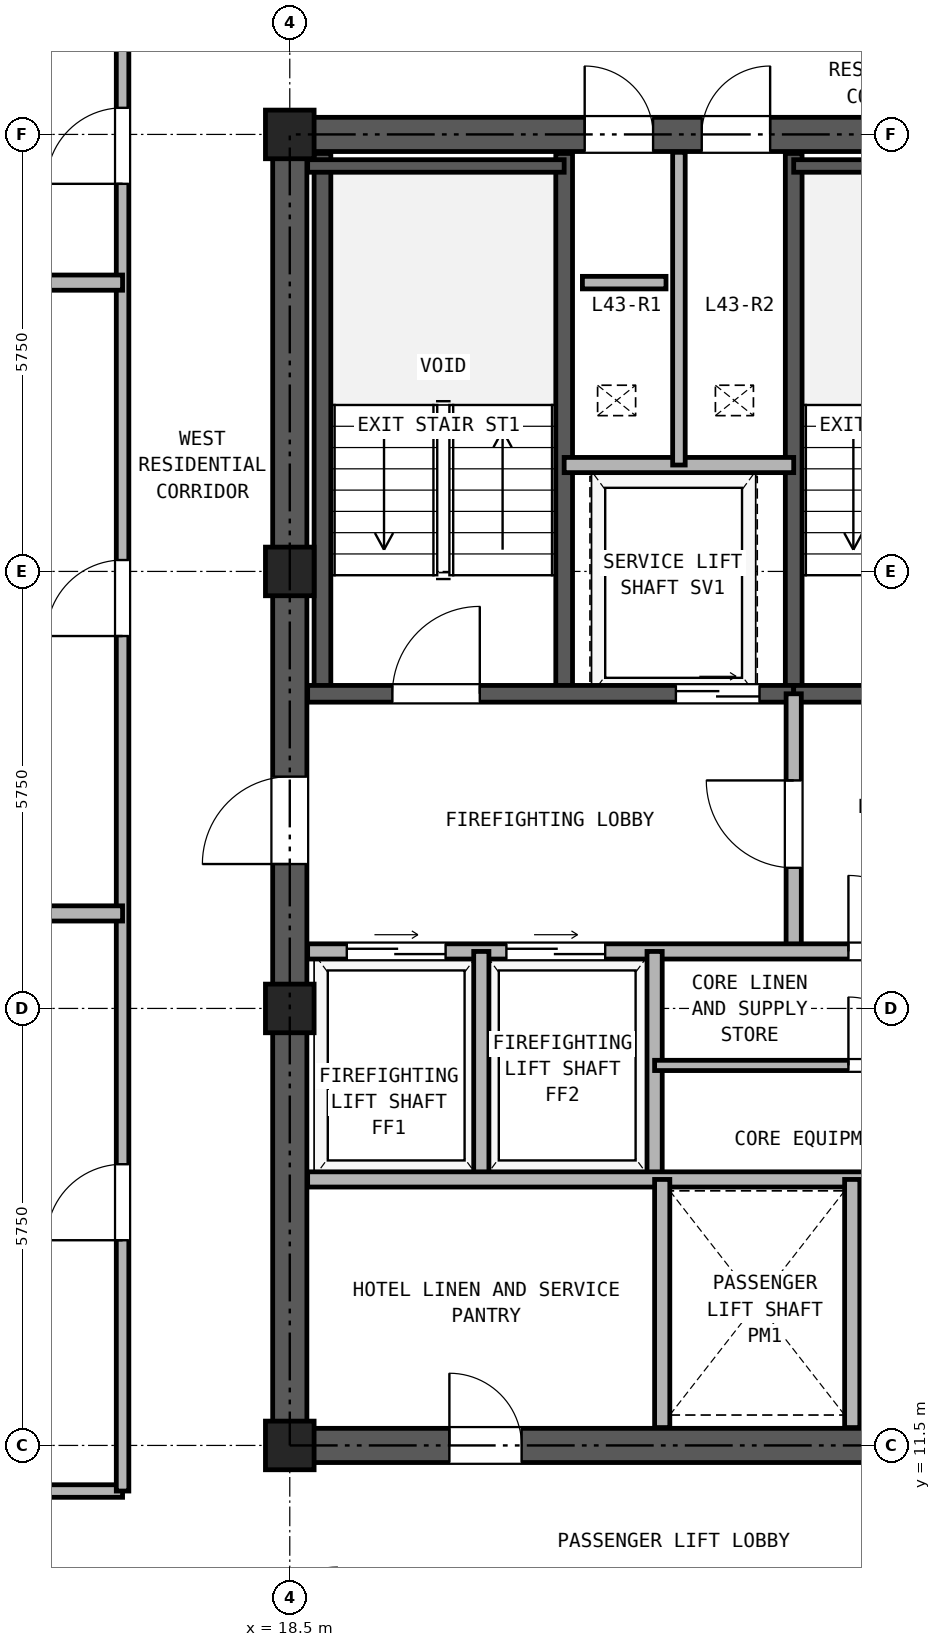
"""IFC4 building model, lengths in metres.
Left out: names, types, materials, properties, quantities, classifications, styles, units other than length and angle.
Written with IfcOpenShell. Run it as: python <this file> out.ifc"""

import sys

from ifc_helpers import new_model, si_unit, direction, frame, frame_2d, origin, origin_2d, place, context, subcontext, project, spatial, rectangle, hollow_rectangle, extrude, source, transform, mapped, element, fill, save


model = new_model("IFC4")
c1 = context("Model", 3, precision=1e-05, world=origin(), true_north=direction((0.0, 1.0)))
c2 = subcontext(c1, "Body", "Model", "MODEL_VIEW")
j1 = project(units=[si_unit("LENGTHUNIT", "METRE"), si_unit("PLANEANGLEUNIT", "RADIAN")], contexts=[c1])
p1 = place(None, origin())
s1 = spatial("IfcSite", under=j1, at=p1, CompositionType="ELEMENT")
p2 = place(p1, origin())
s2 = spatial("IfcBuilding", under=s1, at=p2, CompositionType="ELEMENT")
p3 = place(p2, frame((0.0, 0.0, 156.1)))
s3 = spatial("IfcBuildingStorey", under=s2, at=p3, CompositionType="ELEMENT", Elevation=156.1)
m1 = source(origin(), c2, "Body", "SweptSolid", [
    extrude(hollow_rectangle(XDim=0.64, YDim=0.64, WallThickness=0.035, at=origin_2d()), origin(), (0.0, 0.0, 1.0), 2.95),
])
for number, where, z_axis, x_axis in (
    (1, (18.5, 11.5, 0.0), (0.0, 0.0, 1.0), (1.0, 0.0, 0.0)),
    (2, (18.5, 17.25, 0.0), (0.0, 0.0, 1.0), (1.0, 0.0, 0.0)),
    (3, (18.5, 23.0, 0.0), (0.0, 0.0, 1.0), (1.0, 0.0, 0.0)),
    (4, (18.5, 28.75, 0.0), (0.0, 0.0, 1.0), (1.0, 0.0, 0.0)),
):
    element("IfcColumn", number, at=place(p3, frame(where, z_axis=z_axis, x_axis=x_axis)), inside=s3, PredefinedType="COLUMN", context=c2, shape_type="MappedRepresentation", body=[
        mapped(m1, transform((0.0, 0.0, 0.0), x_axis=(1.0, 0.0, 0.0), y_axis=(0.0, 1.0, 0.0), z_axis=(0.0, 0.0, 1.0), scale=1.0)),
    ])
p4 = place(p3, frame((18.275, 11.5, 0.0), z_axis=(0.0, 0.0, 1.0), x_axis=(1.0, 0.0, 0.0)))
e5 = element("IfcWall", 5, at=p4, inside=s3, PredefinedType="SHEAR", context=c2, shape_type="SweptSolid", body=[
    extrude(rectangle(XDim=10.45, YDim=0.45, at=frame_2d((5.225, 0.0))), origin(), (0.0, 0.0, 1.0), 2.95),
])
p5 = place(p4, frame((2.325, 0.0, 0.0)))
e6 = element("IfcOpeningElement", 6, at=p5, cuts=e5, PredefinedType="OPENING", context=c2, shape_type="SweptSolid", body=[
    extrude(rectangle(XDim=0.95, YDim=2.15, at=frame_2d((0.475, 1.075))), frame((0.0, 0.235, 0.0), z_axis=(0.0, -1.0, 0.0), x_axis=(1.0, 0.0, 0.0)), (0.0, 0.0, 1.0), 0.47),
])
p6 = place(p4, frame((8.225, 0.0, 0.0)))
e7 = element("IfcOpeningElement", 7, at=p6, cuts=e5, PredefinedType="OPENING", context=c2, shape_type="SweptSolid", body=[
    extrude(rectangle(XDim=1.1, YDim=2.25, at=frame_2d((0.55, 1.125))), frame((0.0, 0.235, 0.0), z_axis=(0.0, -1.0, 0.0), x_axis=(1.0, 0.0, 0.0)), (0.0, 0.0, 1.0), 0.47),
])
p7 = place(p3, frame((18.275, 28.75, 0.0), z_axis=(0.0, 0.0, 1.0), x_axis=(1.0, 0.0, 0.0)))
e8 = element("IfcWall", 8, at=p7, inside=s3, PredefinedType="SHEAR", context=c2, shape_type="SweptSolid", body=[
    extrude(rectangle(XDim=10.45, YDim=0.45, at=frame_2d((5.225, 0.0))), origin(), (0.0, 0.0, 1.0), 2.95),
])
p8 = place(p7, frame((4.105, 0.0, 0.0)))
e9 = element("IfcOpeningElement", 9, at=p8, cuts=e8, PredefinedType="OPENING", context=c2, shape_type="SweptSolid", body=[
    extrude(rectangle(XDim=0.9, YDim=2.05, at=frame_2d((0.45, 1.025))), frame((0.0, 0.235, 0.0), z_axis=(0.0, -1.0, 0.0), x_axis=(1.0, 0.0, 0.0)), (0.0, 0.0, 1.0), 0.47),
])
p9 = place(p7, frame((5.645, 0.0, 0.0)))
e10 = element("IfcOpeningElement", 10, at=p9, cuts=e8, PredefinedType="OPENING", context=c2, shape_type="SweptSolid", body=[
    extrude(rectangle(XDim=0.9, YDim=2.05, at=frame_2d((0.45, 1.025))), frame((0.0, 0.235, 0.0), z_axis=(0.0, -1.0, 0.0), x_axis=(1.0, 0.0, 0.0)), (0.0, 0.0, 1.0), 0.47),
])
p10 = place(p3, frame((18.5, 11.725, 0.0), z_axis=(0.0, 0.0, 1.0), x_axis=(0.0, 1.0, 0.0)))
e11 = element("IfcWall", 11, at=p10, inside=s3, PredefinedType="SHEAR", context=c2, shape_type="SweptSolid", body=[
    extrude(rectangle(XDim=16.8, YDim=0.45, at=frame_2d((8.4, 0.0))), origin(), (0.0, 0.0, 1.0), 2.95),
])
p11 = place(p10, frame((7.425, 0.0, 0.0)))
e12 = element("IfcOpeningElement", 12, at=p11, cuts=e11, PredefinedType="OPENING", context=c2, shape_type="SweptSolid", body=[
    extrude(rectangle(XDim=1.15, YDim=2.2, at=frame_2d((0.575, 1.1))), frame((0.0, 0.235, 0.0), z_axis=(0.0, -1.0, 0.0), x_axis=(1.0, 0.0, 0.0)), (0.0, 0.0, 1.0), 0.47),
])
for number, where, z_axis, x_axis in (
    (13, (18.93, 21.39, 0.0), (0.0, 0.0, 1.0), (0.0, 1.0, 0.0)),
    (14, (22.11, 21.39, 0.0), (0.0, 0.0, 1.0), (0.0, 1.0, 0.0)),
    (15, (25.13, 21.39, 0.0), (0.0, 0.0, 1.0), (0.0, 1.0, 0.0)),
):
    element("IfcWall", number, at=place(p3, frame(where, z_axis=z_axis, x_axis=x_axis)), inside=s3, PredefinedType="SOLIDWALL", context=c2, shape_type="SweptSolid", body=[
        extrude(rectangle(XDim=7.11, YDim=0.22, at=frame_2d((3.555, 0.0))), origin(), (0.0, 0.0, 1.0), 2.95),
    ])
p12 = place(p3, frame((18.735, 28.335, 0.0), z_axis=(0.0, 0.0, 1.0), x_axis=(1.0, 0.0, 0.0)))
e16 = element("IfcWall", 16, at=p12, inside=s3, PredefinedType="PARTITIONING", context=c2, shape_type="SweptSolid", body=[
    extrude(rectangle(XDim=3.375, YDim=0.165, at=frame_2d((1.688, 0.0))), origin(), (0.0, 0.0, 1.0), 2.95),
])
p13 = place(p3, frame((25.13, 28.335, 0.0), z_axis=(0.0, 0.0, 1.0), x_axis=(1.0, 0.0, 0.0)))
e17 = element("IfcWall", 17, at=p13, inside=s3, PredefinedType="PARTITIONING", context=c2, shape_type="SweptSolid", body=[
    extrude(rectangle(XDim=3.135, YDim=0.165, at=frame_2d((1.567, 0.0))), origin(), (0.0, 0.0, 1.0), 2.95),
])
p14 = place(p3, frame((18.735, 21.39, 0.0), z_axis=(0.0, 0.0, 1.0), x_axis=(1.0, 0.0, 0.0)))
e18 = element("IfcWall", 18, at=p14, inside=s3, PredefinedType="SOLIDWALL", context=c2, shape_type="SweptSolid", body=[
    extrude(rectangle(XDim=6.395, YDim=0.22, at=frame_2d((3.197, 0.0))), origin(), (0.0, 0.0, 1.0), 2.95),
])
p15 = place(p14, frame((1.115, 0.0, 0.0)))
e19 = element("IfcOpeningElement", 19, at=p15, cuts=e18, PredefinedType="OPENING", context=c2, shape_type="SweptSolid", body=[
    extrude(rectangle(XDim=1.15, YDim=2.2, at=frame_2d((0.575, 1.1))), frame((0.0, 0.12, 0.0), z_axis=(0.0, -1.0, 0.0), x_axis=(1.0, 0.0, 0.0)), (0.0, 0.0, 1.0), 0.24),
])
p16 = place(p14, frame((4.845, 0.0, 0.0)))
e20 = element("IfcOpeningElement", 20, at=p16, cuts=e18, PredefinedType="OPENING", context=c2, shape_type="SweptSolid", body=[
    extrude(rectangle(XDim=1.1, YDim=2.25, at=frame_2d((0.55, 1.125))), frame((0.0, 0.12, 0.0), z_axis=(0.0, -1.0, 0.0), x_axis=(1.0, 0.0, 0.0)), (0.0, 0.0, 1.0), 0.24),
])
p17 = place(p3, frame((25.13, 21.39, 0.0), z_axis=(0.0, 0.0, 1.0), x_axis=(1.0, 0.0, 0.0)))
e21 = element("IfcWall", 21, at=p17, inside=s3, PredefinedType="SOLIDWALL", context=c2, shape_type="SweptSolid", body=[
    extrude(rectangle(XDim=3.135, YDim=0.22, at=frame_2d((1.567, 0.0))), origin(), (0.0, 0.0, 1.0), 2.95),
])
p18 = place(p17, frame((0.92, 0.0, 0.0)))
e22 = element("IfcOpeningElement", 22, at=p18, cuts=e21, PredefinedType="OPENING", context=c2, shape_type="SweptSolid", body=[
    extrude(rectangle(XDim=1.15, YDim=2.2, at=frame_2d((0.575, 1.1))), frame((0.0, 0.12, 0.0), z_axis=(0.0, -1.0, 0.0), x_axis=(1.0, 0.0, 0.0)), (0.0, 0.0, 1.0), 0.24),
])
p19 = place(p3, frame((22.11, 24.4, 0.0), z_axis=(0.0, 0.0, 1.0), x_axis=(1.0, 0.0, 0.0)))
e23 = element("IfcWall", 23, at=p19, inside=s3, PredefinedType="PARTITIONING", context=c2, shape_type="SweptSolid", body=[
    extrude(rectangle(XDim=3.02, YDim=0.2, at=frame_2d((1.51, 0.0))), origin(), (0.0, 0.0, 1.0), 2.95),
])
p20 = place(p3, frame((23.62, 24.4, 0.0), z_axis=(0.0, 0.0, 1.0), x_axis=(0.0, 1.0, 0.0)))
e24 = element("IfcWall", 24, at=p20, inside=s3, PredefinedType="PARTITIONING", context=c2, shape_type="SweptSolid", body=[
    extrude(rectangle(XDim=4.115, YDim=0.165, at=frame_2d((2.058, 0.0))), origin(), (0.0, 0.0, 1.0), 2.95),
])
p21 = place(p3, frame((25.13, 18.0, 0.0), z_axis=(0.0, 0.0, 1.0), x_axis=(0.0, 1.0, 0.0)))
e25 = element("IfcWall", 25, at=p21, inside=s3, PredefinedType="PARTITIONING", context=c2, shape_type="SweptSolid", body=[
    extrude(rectangle(XDim=3.39, YDim=0.2, at=frame_2d((1.695, 0.0))), origin(), (0.0, 0.0, 1.0), 2.95),
])
p22 = place(p21, frame((1.1, 0.0, 0.0)))
e26 = element("IfcOpeningElement", 26, at=p22, cuts=e25, PredefinedType="OPENING", context=c2, shape_type="SweptSolid", body=[
    extrude(rectangle(XDim=1.15, YDim=2.2, at=frame_2d((0.575, 1.1))), frame((0.0, 0.11, 0.0), z_axis=(0.0, -1.0, 0.0), x_axis=(1.0, 0.0, 0.0)), (0.0, 0.0, 1.0), 0.22),
])
p23 = place(p3, frame((18.735, 18.0, 0.0), z_axis=(0.0, 0.0, 1.0), x_axis=(1.0, 0.0, 0.0)))
e27 = element("IfcWall", 27, at=p23, inside=s3, PredefinedType="PARTITIONING", context=c2, shape_type="SweptSolid", body=[
    extrude(rectangle(XDim=9.53, YDim=0.2, at=frame_2d((4.765, 0.0))), origin(), (0.0, 0.0, 1.0), 2.95),
])
p24 = place(p23, frame((0.515, 0.0, 0.0)))
e28 = element("IfcOpeningElement", 28, at=p24, cuts=e27, PredefinedType="OPENING", context=c2, shape_type="SweptSolid", body=[
    extrude(rectangle(XDim=1.3, YDim=2.3, at=frame_2d((0.65, 1.15))), frame((0.0, 0.11, 0.0), z_axis=(0.0, -1.0, 0.0), x_axis=(1.0, 0.0, 0.0)), (0.0, 0.0, 1.0), 0.22),
])
p25 = place(p23, frame((2.615, 0.0, 0.0)))
e29 = element("IfcOpeningElement", 29, at=p25, cuts=e27, PredefinedType="OPENING", context=c2, shape_type="SweptSolid", body=[
    extrude(rectangle(XDim=1.3, YDim=2.3, at=frame_2d((0.65, 1.15))), frame((0.0, 0.11, 0.0), z_axis=(0.0, -1.0, 0.0), x_axis=(1.0, 0.0, 0.0)), (0.0, 0.0, 1.0), 0.22),
])
p26 = place(p23, frame((7.115, 0.0, 0.0)))
e30 = element("IfcOpeningElement", 30, at=p26, cuts=e27, PredefinedType="OPENING", context=c2, shape_type="SweptSolid", body=[
    extrude(rectangle(XDim=1.0, YDim=2.15, at=frame_2d((0.5, 1.075))), frame((0.0, 0.11, 0.0), z_axis=(0.0, -1.0, 0.0), x_axis=(1.0, 0.0, 0.0)), (0.0, 0.0, 1.0), 0.22),
])
for number, where, z_axis, x_axis in (
    (31, (21.02, 15.0, 0.0), (0.0, 0.0, 1.0), (0.0, 1.0, 0.0)),
    (32, (23.3, 15.0, 0.0), (0.0, 0.0, 1.0), (0.0, 1.0, 0.0)),
):
    element("IfcWall", number, at=place(p3, frame(where, z_axis=z_axis, x_axis=x_axis)), inside=s3, PredefinedType="PARTITIONING", context=c2, shape_type="SweptSolid", body=[
        extrude(rectangle(XDim=3.0, YDim=0.2, at=frame_2d((1.5, 0.0))), origin(), (0.0, 0.0, 1.0), 2.95),
    ])
p27 = place(p3, frame((18.735, 15.0, 0.0), z_axis=(0.0, 0.0, 1.0), x_axis=(1.0, 0.0, 0.0)))
e33 = element("IfcWall", 33, at=p27, inside=s3, PredefinedType="PARTITIONING", context=c2, shape_type="SweptSolid", body=[
    extrude(rectangle(XDim=9.53, YDim=0.2, at=frame_2d((4.765, 0.0))), origin(), (0.0, 0.0, 1.0), 2.95),
])
p28 = place(p3, frame((23.3, 16.5, 0.0), z_axis=(0.0, 0.0, 1.0), x_axis=(1.0, 0.0, 0.0)))
e34 = element("IfcWall", 34, at=p28, inside=s3, PredefinedType="PARTITIONING", context=c2, shape_type="SweptSolid", body=[
    extrude(rectangle(XDim=4.965, YDim=0.135, at=frame_2d((2.482, 0.0))), origin(), (0.0, 0.0, 1.0), 2.95),
])
p29 = place(p28, frame((2.55, 0.0, 0.0)))
e35 = element("IfcOpeningElement", 35, at=p29, cuts=e34, PredefinedType="OPENING", context=c2, shape_type="SweptSolid", body=[
    extrude(rectangle(XDim=0.9, YDim=2.05, at=frame_2d((0.45, 1.025))), frame((0.0, 0.077, 0.0), z_axis=(0.0, -1.0, 0.0), x_axis=(1.0, 0.0, 0.0)), (0.0, 0.0, 1.0), 0.155),
])
for number, where, z_axis, x_axis in (
    (36, (23.4, 11.735, 0.0), (0.0, 0.0, 1.0), (0.0, 1.0, 0.0)),
    (37, (25.9, 11.735, 0.0), (0.0, 0.0, 1.0), (0.0, 1.0, 0.0)),
):
    element("IfcWall", number, at=place(p3, frame(where, z_axis=z_axis, x_axis=x_axis)), inside=s3, PredefinedType="PARTITIONING", context=c2, shape_type="SweptSolid", body=[
        extrude(rectangle(XDim=3.265, YDim=0.2, at=frame_2d((1.632, 0.0))), origin(), (0.0, 0.0, 1.0), 2.95),
    ])
p30 = place(p3, frame((7.6, 10.9, 0.0), z_axis=(0.0, 0.0, 1.0), x_axis=(1.0, 0.0, 0.0)))
e38 = element("IfcWall", 38, at=p30, inside=s3, PredefinedType="PARTITIONING", context=c2, shape_type="SweptSolid", body=[
    extrude(rectangle(XDim=8.7, YDim=0.165, at=frame_2d((4.35, 0.0))), origin(), (0.0, 0.0, 1.0), 2.95),
])
p31 = place(p3, frame((16.3, 10.9, 0.0), z_axis=(0.0, 0.0, 1.0), x_axis=(0.0, 1.0, 0.0)))
e39 = element("IfcWall", 39, at=p31, inside=s3, PredefinedType="PARTITIONING", context=c2, shape_type="SweptSolid", body=[
    extrude(rectangle(XDim=24.24, YDim=0.165, at=frame_2d((12.12, 0.0))), origin(), (0.0, 0.0, 1.0), 2.95),
])
p32 = place(p31, frame((3.3, 0.0, 0.0)))
e40 = element("IfcOpeningElement", 40, at=p32, cuts=e39, PredefinedType="OPENING", context=c2, shape_type="SweptSolid", body=[
    extrude(rectangle(XDim=1.0, YDim=2.15, at=frame_2d((0.5, 1.075))), frame((0.0, 0.093, 0.0), z_axis=(0.0, -1.0, 0.0), x_axis=(1.0, 0.0, 0.0)), (0.0, 0.0, 1.0), 0.185),
])
p33 = place(p31, frame((11.25, 0.0, 0.0)))
e41 = element("IfcOpeningElement", 41, at=p33, cuts=e39, PredefinedType="OPENING", context=c2, shape_type="SweptSolid", body=[
    extrude(rectangle(XDim=1.0, YDim=2.15, at=frame_2d((0.5, 1.075))), frame((0.0, 0.093, 0.0), z_axis=(0.0, -1.0, 0.0), x_axis=(1.0, 0.0, 0.0)), (0.0, 0.0, 1.0), 0.185),
])
p34 = place(p31, frame((17.2, 0.0, 0.0)))
e42 = element("IfcOpeningElement", 42, at=p34, cuts=e39, PredefinedType="OPENING", context=c2, shape_type="SweptSolid", body=[
    extrude(rectangle(XDim=1.0, YDim=2.15, at=frame_2d((0.5, 1.075))), frame((0.0, 0.093, 0.0), z_axis=(0.0, -1.0, 0.0), x_axis=(1.0, 0.0, 0.0)), (0.0, 0.0, 1.0), 0.185),
])
for number, where, z_axis, x_axis in (
    (43, (0.16, 18.5, 0.0), (0.0, 0.0, 1.0), (1.0, 0.0, 0.0)),
    (44, (0.16, 26.8, 0.0), (0.0, 0.0, 1.0), (1.0, 0.0, 0.0)),
):
    element("IfcWall", number, at=place(p3, frame(where, z_axis=z_axis, x_axis=x_axis)), inside=s3, PredefinedType="PARTITIONING", context=c2, shape_type="SweptSolid", body=[
        extrude(rectangle(XDim=16.14, YDim=0.2, at=frame_2d((8.07, 0.0))), origin(), (0.0, 0.0, 1.0), 2.95),
    ])
p35 = place(p3, frame((22.35, 26.8, 0.0), z_axis=(0.0, 0.0, 1.0), x_axis=(1.0, 0.0, 0.0)))
e45 = element("IfcWall", 45, at=p35, inside=s3, PredefinedType="PARTITIONING", context=c2, shape_type="SweptSolid", body=[
    extrude(rectangle(XDim=1.1, YDim=0.165, at=frame_2d((0.55, 0.0))), origin(), (0.0, 0.0, 1.0), 2.95),
])
p36 = place(p15, frame((1.15, 0.0, 0.0), z_axis=(0.0, 0.0, 1.0), x_axis=(-1.0, 0.0, 0.0)))
e46 = element("IfcDoor", 46, at=p36, inside=s3, OperationType="SINGLE_SWING_RIGHT", PredefinedType="DOOR", context=c2, shape_type="SweptSolid", body=[
    extrude(rectangle(XDim=1.15, YDim=2.2, at=frame_2d((0.575, 1.1))), frame((0.0, 0.025, 0.0), z_axis=(0.0, -1.0, 0.0), x_axis=(1.0, 0.0, 0.0)), (0.0, 0.0, 1.0), 0.05),
])
fill(e19, e46)
p37 = place(p16, frame((1.1, 0.0, 0.0), z_axis=(0.0, 0.0, 1.0), x_axis=(-1.0, 0.0, 0.0)))
e47 = element("IfcDoor", 47, at=p37, inside=s3, OperationType="DOUBLE_DOOR_SLIDING", PredefinedType="DOOR", context=c2, shape_type="SweptSolid", body=[
    extrude(rectangle(XDim=1.1, YDim=2.25, at=frame_2d((0.55, 1.125))), frame((0.0, 0.025, 0.0), z_axis=(0.0, -1.0, 0.0), x_axis=(1.0, 0.0, 0.0)), (0.0, 0.0, 1.0), 0.05),
])
fill(e20, e47)
p38 = place(p22, origin())
e48 = element("IfcDoor", 48, at=p38, inside=s3, OperationType="SINGLE_SWING_RIGHT", PredefinedType="DOOR", context=c2, shape_type="SweptSolid", body=[
    extrude(rectangle(XDim=1.15, YDim=2.2, at=frame_2d((0.575, 1.1))), frame((0.0, 0.025, 0.0), z_axis=(0.0, -1.0, 0.0), x_axis=(1.0, 0.0, 0.0)), (0.0, 0.0, 1.0), 0.05),
])
fill(e26, e48)
p39 = place(p24, origin())
e49 = element("IfcDoor", 49, at=p39, inside=s3, OperationType="DOUBLE_DOOR_SLIDING", PredefinedType="DOOR", context=c2, shape_type="SweptSolid", body=[
    extrude(rectangle(XDim=1.3, YDim=2.3, at=frame_2d((0.65, 1.15))), frame((0.0, 0.025, 0.0), z_axis=(0.0, -1.0, 0.0), x_axis=(1.0, 0.0, 0.0)), (0.0, 0.0, 1.0), 0.05),
])
fill(e28, e49)
p40 = place(p25, origin())
e50 = element("IfcDoor", 50, at=p40, inside=s3, OperationType="DOUBLE_DOOR_SLIDING", PredefinedType="DOOR", context=c2, shape_type="SweptSolid", body=[
    extrude(rectangle(XDim=1.3, YDim=2.3, at=frame_2d((0.65, 1.15))), frame((0.0, 0.025, 0.0), z_axis=(0.0, -1.0, 0.0), x_axis=(1.0, 0.0, 0.0)), (0.0, 0.0, 1.0), 0.05),
])
fill(e29, e50)
p41 = place(p26, frame((1.0, 0.0, 0.0), z_axis=(0.0, 0.0, 1.0), x_axis=(-1.0, 0.0, 0.0)))
e51 = element("IfcDoor", 51, at=p41, inside=s3, OperationType="SINGLE_SWING_LEFT", PredefinedType="DOOR", context=c2, shape_type="SweptSolid", body=[
    extrude(rectangle(XDim=1.0, YDim=2.15, at=frame_2d((0.5, 1.075))), frame((0.0, 0.025, 0.0), z_axis=(0.0, -1.0, 0.0), x_axis=(1.0, 0.0, 0.0)), (0.0, 0.0, 1.0), 0.05),
])
fill(e30, e51)
p42 = place(p29, frame((0.9, 0.0, 0.0), z_axis=(0.0, 0.0, 1.0), x_axis=(-1.0, 0.0, 0.0)))
e52 = element("IfcDoor", 52, at=p42, inside=s3, OperationType="SINGLE_SWING_LEFT", PredefinedType="DOOR", context=c2, shape_type="SweptSolid", body=[
    extrude(rectangle(XDim=0.9, YDim=2.05, at=frame_2d((0.45, 1.025))), frame((0.0, 0.025, 0.0), z_axis=(0.0, -1.0, 0.0), x_axis=(1.0, 0.0, 0.0)), (0.0, 0.0, 1.0), 0.05),
])
fill(e35, e52)
p43 = place(p11, frame((1.15, 0.0, 0.0), z_axis=(0.0, 0.0, 1.0), x_axis=(-1.0, 0.0, 0.0)))
e53 = element("IfcDoor", 53, at=p43, inside=s3, OperationType="SINGLE_SWING_LEFT", PredefinedType="DOOR", context=c2, shape_type="SweptSolid", body=[
    extrude(rectangle(XDim=1.15, YDim=2.2, at=frame_2d((0.575, 1.1))), frame((0.0, 0.025, 0.0), z_axis=(0.0, -1.0, 0.0), x_axis=(1.0, 0.0, 0.0)), (0.0, 0.0, 1.0), 0.05),
])
fill(e12, e53)
p44 = place(p8, origin())
e54 = element("IfcDoor", 54, at=p44, inside=s3, OperationType="SINGLE_SWING_LEFT", PredefinedType="DOOR", context=c2, shape_type="SweptSolid", body=[
    extrude(rectangle(XDim=0.9, YDim=2.05, at=frame_2d((0.45, 1.025))), frame((0.0, 0.025, 0.0), z_axis=(0.0, -1.0, 0.0), x_axis=(1.0, 0.0, 0.0)), (0.0, 0.0, 1.0), 0.05),
])
fill(e9, e54)
p45 = place(p9, origin())
e55 = element("IfcDoor", 55, at=p45, inside=s3, OperationType="SINGLE_SWING_RIGHT", PredefinedType="DOOR", context=c2, shape_type="SweptSolid", body=[
    extrude(rectangle(XDim=0.9, YDim=2.05, at=frame_2d((0.45, 1.025))), frame((0.0, 0.025, 0.0), z_axis=(0.0, -1.0, 0.0), x_axis=(1.0, 0.0, 0.0)), (0.0, 0.0, 1.0), 0.05),
])
fill(e10, e55)
p46 = place(p5, frame((0.95, 0.0, 0.0), z_axis=(0.0, 0.0, 1.0), x_axis=(-1.0, 0.0, 0.0)))
e56 = element("IfcDoor", 56, at=p46, inside=s3, OperationType="SINGLE_SWING_LEFT", PredefinedType="DOOR", context=c2, shape_type="SweptSolid", body=[
    extrude(rectangle(XDim=0.95, YDim=2.15, at=frame_2d((0.475, 1.075))), frame((0.0, 0.025, 0.0), z_axis=(0.0, -1.0, 0.0), x_axis=(1.0, 0.0, 0.0)), (0.0, 0.0, 1.0), 0.05),
])
fill(e6, e56)
p47 = place(p32, origin())
e57 = element("IfcDoor", 57, at=p47, inside=s3, OperationType="SINGLE_SWING_LEFT", PredefinedType="DOOR", context=c2, shape_type="SweptSolid", body=[
    extrude(rectangle(XDim=1.0, YDim=2.15, at=frame_2d((0.5, 1.075))), frame((0.0, 0.025, 0.0), z_axis=(0.0, -1.0, 0.0), x_axis=(1.0, 0.0, 0.0)), (0.0, 0.0, 1.0), 0.05),
])
fill(e40, e57)
p48 = place(p33, origin())
e58 = element("IfcDoor", 58, at=p48, inside=s3, OperationType="SINGLE_SWING_LEFT", PredefinedType="DOOR", context=c2, shape_type="SweptSolid", body=[
    extrude(rectangle(XDim=1.0, YDim=2.15, at=frame_2d((0.5, 1.075))), frame((0.0, 0.025, 0.0), z_axis=(0.0, -1.0, 0.0), x_axis=(1.0, 0.0, 0.0)), (0.0, 0.0, 1.0), 0.05),
])
fill(e41, e58)
p49 = place(p34, origin())
e59 = element("IfcDoor", 59, at=p49, inside=s3, OperationType="SINGLE_SWING_LEFT", PredefinedType="DOOR", context=c2, shape_type="SweptSolid", body=[
    extrude(rectangle(XDim=1.0, YDim=2.15, at=frame_2d((0.5, 1.075))), frame((0.0, 0.025, 0.0), z_axis=(0.0, -1.0, 0.0), x_axis=(1.0, 0.0, 0.0)), (0.0, 0.0, 1.0), 0.05),
])
fill(e42, e59)
save(model, sys.argv[1])
